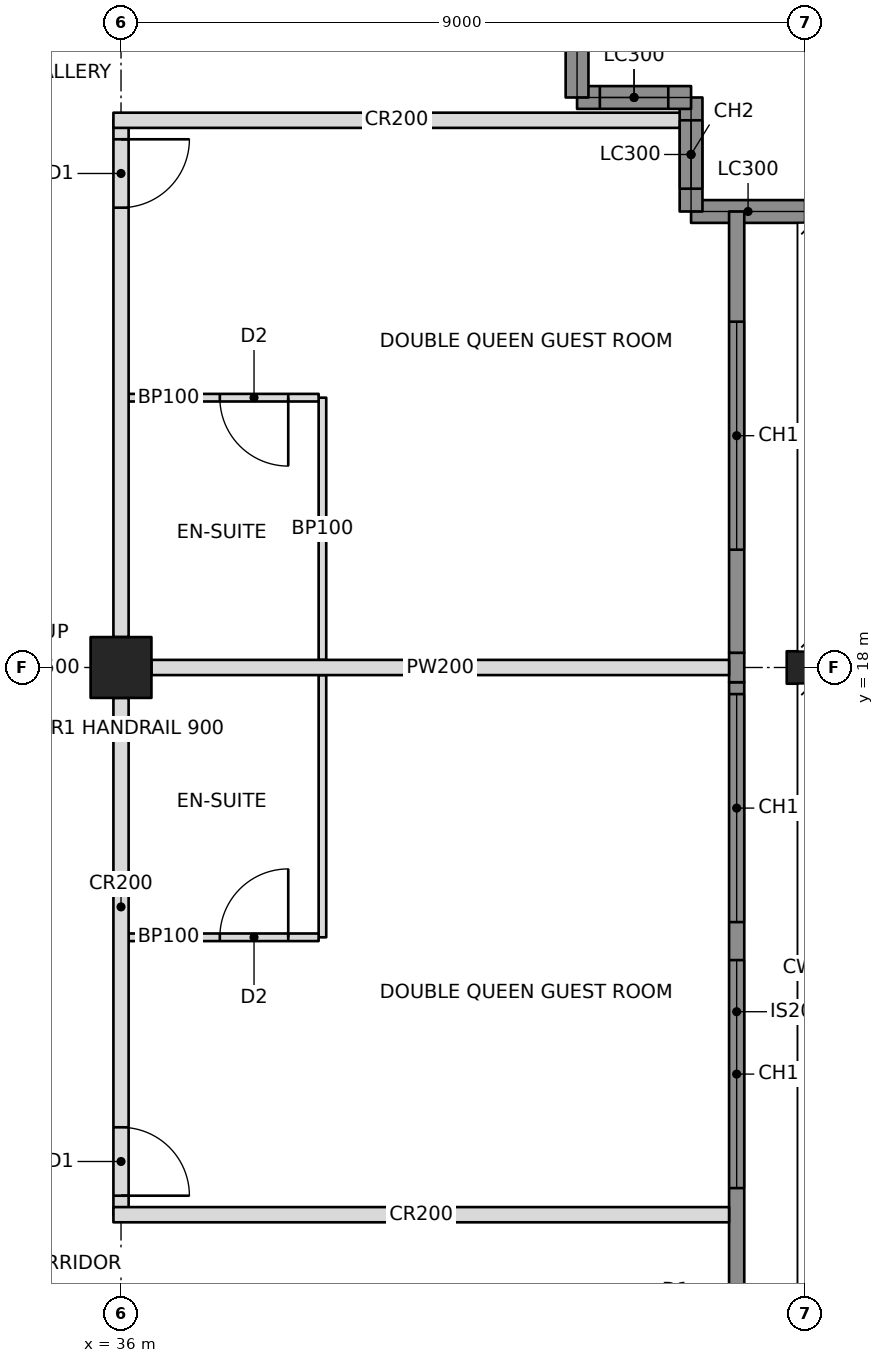
"""IFC4 building model, lengths in metres.
Left out: names, types, materials, properties, quantities, classifications, styles, units other than length and angle.
Written with IfcOpenShell. Run it as: python <this file> out.ifc"""

import sys

from ifc_helpers import new_model, si_unit, direction, frame, frame_2d, origin, origin_2d, place, context, subcontext, project, spatial, rectangle, hollow_rectangle, i_section, extrude, element, fill, save


model = new_model("IFC4")
c1 = context("Model", 3, precision=1e-05, world=origin(), true_north=direction((0.0, 1.0)))
c2 = subcontext(c1, "Body", "Model", "MODEL_VIEW")
j1 = project(units=[si_unit("LENGTHUNIT", "METRE"), si_unit("PLANEANGLEUNIT", "RADIAN")], contexts=[c1])
p1 = place(None, origin())
s1 = spatial("IfcSite", under=j1, at=p1, CompositionType="ELEMENT")
p2 = place(p1, origin())
s2 = spatial("IfcBuilding", under=s1, at=p2, CompositionType="ELEMENT")
p3 = place(p2, frame((0.0, 0.0, 214.8)))
s3 = spatial("IfcBuildingStorey", under=s2, at=p3, CompositionType="ELEMENT", Elevation=214.8)
p4 = place(p3, frame((36.0, 18.0, 0.0), z_axis=(0.0, 0.0, 1.0), x_axis=(0.0, 1.0, 0.0)))
e1 = element("IfcColumn", 1, at=p4, inside=s3, PredefinedType="COLUMN", context=c2, shape_type="SweptSolid", body=[
    extrude(hollow_rectangle(XDim=0.8, YDim=0.8, WallThickness=0.05, at=origin_2d()), origin(), (0.0, 0.0, 1.0), 3.4),
])
p5 = place(p3, frame((45.0, 18.0, 0.0), z_axis=(0.0, 0.0, 1.0), x_axis=(0.0, 1.0, 0.0)))
e2 = element("IfcColumn", 2, at=p5, inside=s3, PredefinedType="COLUMN", context=c2, shape_type="SweptSolid", body=[
    extrude(i_section(OverallWidth=0.427, OverallDepth=0.483, WebThickness=0.051, FlangeThickness=0.082, at=origin_2d()), origin(), (0.0, 0.0, 1.0), 3.4),
])
p6 = place(p3, frame((45.0, 24.0, 0.0), z_axis=(0.0, 0.0, 1.0), x_axis=(-1.0, 0.0, 0.0)))
e3 = element("IfcWall", 3, at=p6, inside=s3, PredefinedType="SOLIDWALL", context=c2, shape_type="SweptSolid", body=[
    extrude(rectangle(XDim=1.5, YDim=0.3, at=frame_2d((0.75, 0.0))), origin(), (0.0, 0.0, 1.0), 2.42),
])
p7 = place(p3, frame((43.5, 24.0, 0.0), z_axis=(0.0, 0.0, 1.0), x_axis=(0.0, 1.0, 0.0)))
e4 = element("IfcWall", 4, at=p7, inside=s3, PredefinedType="SOLIDWALL", context=c2, shape_type="SweptSolid", body=[
    extrude(rectangle(XDim=1.5, YDim=0.3, at=frame_2d((0.75, 0.0))), origin(), (0.0, 0.0, 1.0), 3.2),
])
p8 = place(p7, frame((0.3, 0.0, 0.6)))
e5 = element("IfcOpeningElement", 5, at=p8, cuts=e4, PredefinedType="OPENING", context=c2, shape_type="SweptSolid", body=[
    extrude(rectangle(XDim=0.9, YDim=2.2, at=frame_2d((0.45, 1.1))), frame((0.0, 0.16, 0.0), z_axis=(0.0, -1.0, 0.0), x_axis=(1.0, 0.0, 0.0)), (0.0, 0.0, 1.0), 0.32),
])
p9 = place(p3, frame((43.5, 25.5, 0.0), z_axis=(0.0, 0.0, 1.0), x_axis=(-1.0, 0.0, 0.0)))
e6 = element("IfcWall", 6, at=p9, inside=s3, PredefinedType="SOLIDWALL", context=c2, shape_type="SweptSolid", body=[
    extrude(rectangle(XDim=1.5, YDim=0.3, at=frame_2d((0.75, 0.0))), origin(), (0.0, 0.0, 1.0), 3.2),
])
p10 = place(p9, frame((0.3, 0.0, 0.6)))
e7 = element("IfcOpeningElement", 7, at=p10, cuts=e6, PredefinedType="OPENING", context=c2, shape_type="SweptSolid", body=[
    extrude(rectangle(XDim=0.9, YDim=2.2, at=frame_2d((0.45, 1.1))), frame((0.0, 0.16, 0.0), z_axis=(0.0, -1.0, 0.0), x_axis=(1.0, 0.0, 0.0)), (0.0, 0.0, 1.0), 0.32),
])
p11 = place(p3, frame((42.0, 25.5, 0.0), z_axis=(0.0, 0.0, 1.0), x_axis=(0.0, 1.0, 0.0)))
e8 = element("IfcWall", 8, at=p11, inside=s3, PredefinedType="SOLIDWALL", context=c2, shape_type="SweptSolid", body=[
    extrude(rectangle(XDim=1.5, YDim=0.3, at=frame_2d((0.75, 0.0))), origin(), (0.0, 0.0, 1.0), 2.42),
])
p12 = place(p3, frame((36.0, 10.8, 0.0), z_axis=(0.0, 0.0, 1.0), x_axis=(0.0, 1.0, 0.0)))
e9 = element("IfcWall", 9, at=p12, inside=s3, PredefinedType="PARTITIONING", context=c2, shape_type="SweptSolid", body=[
    extrude(rectangle(XDim=6.8, YDim=0.2, at=frame_2d((3.4, 0.0))), origin(), (0.0, 0.0, 1.0), 2.405),
])
p13 = place(p12, frame((0.25, 0.0, 0.0)))
e10 = element("IfcOpeningElement", 10, at=p13, cuts=e9, PredefinedType="OPENING", context=c2, shape_type="SweptSolid", body=[
    extrude(rectangle(XDim=0.9, YDim=2.1, at=frame_2d((0.45, 1.05))), frame((0.0, 0.11, 0.0), z_axis=(0.0, -1.0, 0.0), x_axis=(1.0, 0.0, 0.0)), (0.0, 0.0, 1.0), 0.22),
])
p14 = place(p3, frame((36.0, 18.4, 0.0), z_axis=(0.0, 0.0, 1.0), x_axis=(0.0, 1.0, 0.0)))
e11 = element("IfcWall", 11, at=p14, inside=s3, PredefinedType="PARTITIONING", context=c2, shape_type="SweptSolid", body=[
    extrude(rectangle(XDim=6.8, YDim=0.2, at=frame_2d((3.4, 0.0))), origin(), (0.0, 0.0, 1.0), 2.405),
])
p15 = place(p14, frame((5.65, 0.0, 0.0)))
e12 = element("IfcOpeningElement", 12, at=p15, cuts=e11, PredefinedType="OPENING", context=c2, shape_type="SweptSolid", body=[
    extrude(rectangle(XDim=0.9, YDim=2.1, at=frame_2d((0.45, 1.05))), frame((0.0, 0.11, 0.0), z_axis=(0.0, -1.0, 0.0), x_axis=(1.0, 0.0, 0.0)), (0.0, 0.0, 1.0), 0.22),
])
p16 = place(p3, frame((35.9, 10.8, 0.0), z_axis=(0.0, 0.0, 1.0), x_axis=(1.0, 0.0, 0.0)))
e13 = element("IfcWall", 13, at=p16, inside=s3, PredefinedType="PARTITIONING", context=c2, shape_type="SweptSolid", body=[
    extrude(rectangle(XDim=8.1, YDim=0.2, at=frame_2d((4.05, 0.0))), origin(), (0.0, 0.0, 1.0), 2.404),
])
p17 = place(p3, frame((35.9, 25.2, 0.0), z_axis=(0.0, 0.0, 1.0), x_axis=(1.0, 0.0, 0.0)))
e14 = element("IfcWall", 14, at=p17, inside=s3, PredefinedType="PARTITIONING", context=c2, shape_type="SweptSolid", body=[
    extrude(rectangle(XDim=7.45, YDim=0.2, at=frame_2d((3.725, 0.0))), origin(), (0.0, 0.0, 1.0), 2.404),
])
p18 = place(p3, frame((36.4, 18.0, 0.0), z_axis=(0.0, 0.0, 1.0), x_axis=(1.0, 0.0, 0.0)))
e15 = element("IfcWall", 15, at=p18, inside=s3, PredefinedType="PARTITIONING", context=c2, shape_type="SweptSolid", body=[
    extrude(rectangle(XDim=7.6, YDim=0.2, at=frame_2d((3.8, 0.0))), origin(), (0.0, 0.0, 1.0), 2.405),
])
p19 = place(p3, frame((38.65, 14.45, 0.0), z_axis=(0.0, 0.0, 1.0), x_axis=(0.0, 1.0, 0.0)))
e16 = element("IfcWall", 16, at=p19, inside=s3, PredefinedType="PARTITIONING", context=c2, shape_type="SweptSolid", body=[
    extrude(rectangle(XDim=3.45, YDim=0.1, at=frame_2d((1.725, 0.0))), origin(), (0.0, 0.0, 1.0), 2.404),
])
p20 = place(p3, frame((36.1, 14.45, 0.0), z_axis=(0.0, 0.0, 1.0), x_axis=(1.0, 0.0, 0.0)))
e17 = element("IfcWall", 17, at=p20, inside=s3, PredefinedType="PARTITIONING", context=c2, shape_type="SweptSolid", body=[
    extrude(rectangle(XDim=2.5, YDim=0.1, at=frame_2d((1.25, 0.0))), origin(), (0.0, 0.0, 1.0), 2.404),
])
p21 = place(p20, frame((1.2, 0.0, 0.0)))
e18 = element("IfcOpeningElement", 18, at=p21, cuts=e17, PredefinedType="OPENING", context=c2, shape_type="SweptSolid", body=[
    extrude(rectangle(XDim=0.9, YDim=2.1, at=frame_2d((0.45, 1.05))), frame((0.0, 0.06, 0.0), z_axis=(0.0, -1.0, 0.0), x_axis=(1.0, 0.0, 0.0)), (0.0, 0.0, 1.0), 0.12),
])
p22 = place(p3, frame((38.65, 18.1, 0.0), z_axis=(0.0, 0.0, 1.0), x_axis=(0.0, 1.0, 0.0)))
e19 = element("IfcWall", 19, at=p22, inside=s3, PredefinedType="PARTITIONING", context=c2, shape_type="SweptSolid", body=[
    extrude(rectangle(XDim=3.45, YDim=0.1, at=frame_2d((1.725, 0.0))), origin(), (0.0, 0.0, 1.0), 2.404),
])
p23 = place(p3, frame((36.1, 21.55, 0.0), z_axis=(0.0, 0.0, 1.0), x_axis=(1.0, 0.0, 0.0)))
e20 = element("IfcWall", 20, at=p23, inside=s3, PredefinedType="PARTITIONING", context=c2, shape_type="SweptSolid", body=[
    extrude(rectangle(XDim=2.5, YDim=0.1, at=frame_2d((1.25, 0.0))), origin(), (0.0, 0.0, 1.0), 2.404),
])
p24 = place(p23, frame((1.2, 0.0, 0.0)))
e21 = element("IfcOpeningElement", 21, at=p24, cuts=e20, PredefinedType="OPENING", context=c2, shape_type="SweptSolid", body=[
    extrude(rectangle(XDim=0.9, YDim=2.1, at=frame_2d((0.45, 1.05))), frame((0.0, 0.06, 0.0), z_axis=(0.0, -1.0, 0.0), x_axis=(1.0, 0.0, 0.0)), (0.0, 0.0, 1.0), 0.12),
])
p25 = place(p3, frame((44.1, 9.135, 0.0), z_axis=(0.0, 0.0, 1.0), x_axis=(0.0, 1.0, 0.0)))
e22 = element("IfcWall", 22, at=p25, inside=s3, PredefinedType="SOLIDWALL", context=c2, shape_type="SweptSolid", body=[
    extrude(rectangle(XDim=8.671, YDim=0.2, at=frame_2d((4.335, 0.0))), origin(), (0.0, 0.0, 1.0), 3.2),
])
p26 = place(p25, frame((2.015, 0.0, 0.6)))
e23 = element("IfcOpeningElement", 23, at=p26, cuts=e22, PredefinedType="OPENING", context=c2, shape_type="SweptSolid", body=[
    extrude(rectangle(XDim=3.0, YDim=2.2, at=frame_2d((1.5, 1.1))), frame((0.0, 0.11, 0.0), z_axis=(0.0, -1.0, 0.0), x_axis=(1.0, 0.0, 0.0)), (0.0, 0.0, 1.0), 0.22),
])
p27 = place(p25, frame((5.515, 0.0, 0.6)))
e24 = element("IfcOpeningElement", 24, at=p27, cuts=e22, PredefinedType="OPENING", context=c2, shape_type="SweptSolid", body=[
    extrude(rectangle(XDim=3.0, YDim=2.2, at=frame_2d((1.5, 1.1))), frame((0.0, 0.11, 0.0), z_axis=(0.0, -1.0, 0.0), x_axis=(1.0, 0.0, 0.0)), (0.0, 0.0, 1.0), 0.22),
])
p28 = place(p3, frame((44.1, 17.806, 0.0), z_axis=(0.0, 0.0, 1.0), x_axis=(0.0, 1.0, 0.0)))
e25 = element("IfcWall", 25, at=p28, inside=s3, PredefinedType="SOLIDWALL", context=c2, shape_type="SweptSolid", body=[
    extrude(rectangle(XDim=0.388, YDim=0.2, at=frame_2d((0.194, 0.0))), origin(), (0.0, 0.0, 1.0), 2.404),
])
p29 = place(p3, frame((44.1, 18.194, 0.0), z_axis=(0.0, 0.0, 1.0), x_axis=(0.0, 1.0, 0.0)))
e26 = element("IfcWall", 26, at=p29, inside=s3, PredefinedType="SOLIDWALL", context=c2, shape_type="SweptSolid", body=[
    extrude(rectangle(XDim=5.806, YDim=0.2, at=frame_2d((2.903, 0.0))), origin(), (0.0, 0.0, 1.0), 3.2),
])
p30 = place(p29, frame((1.356, 0.0, 0.6)))
e27 = element("IfcOpeningElement", 27, at=p30, cuts=e26, PredefinedType="OPENING", context=c2, shape_type="SweptSolid", body=[
    extrude(rectangle(XDim=3.0, YDim=2.2, at=frame_2d((1.5, 1.1))), frame((0.0, 0.11, 0.0), z_axis=(0.0, -1.0, 0.0), x_axis=(1.0, 0.0, 0.0)), (0.0, 0.0, 1.0), 0.22),
])
p31 = place(p8, origin())
e28 = element("IfcWindow", 28, at=p31, inside=s3, PartitioningType="SINGLE_PANEL", PredefinedType="WINDOW", context=c2, shape_type="SweptSolid", body=[
    extrude(rectangle(XDim=0.9, YDim=2.2, at=frame_2d((0.45, 1.1))), frame((0.0, 0.03, 0.0), z_axis=(0.0, -1.0, 0.0), x_axis=(1.0, 0.0, 0.0)), (0.0, 0.0, 1.0), 0.06),
])
fill(e5, e28)
p32 = place(p10, origin())
e29 = element("IfcWindow", 29, at=p32, inside=s3, PartitioningType="SINGLE_PANEL", PredefinedType="WINDOW", context=c2, shape_type="SweptSolid", body=[
    extrude(rectangle(XDim=0.9, YDim=2.2, at=frame_2d((0.45, 1.1))), frame((0.0, 0.03, 0.0), z_axis=(0.0, -1.0, 0.0), x_axis=(1.0, 0.0, 0.0)), (0.0, 0.0, 1.0), 0.06),
])
fill(e7, e29)
p33 = place(p26, origin())
e30 = element("IfcWindow", 30, at=p33, inside=s3, PartitioningType="TRIPLE_PANEL_VERTICAL", PredefinedType="WINDOW", context=c2, shape_type="SweptSolid", body=[
    extrude(rectangle(XDim=3.0, YDim=2.2, at=frame_2d((1.5, 1.1))), frame((0.0, 0.03, 0.0), z_axis=(0.0, -1.0, 0.0), x_axis=(1.0, 0.0, 0.0)), (0.0, 0.0, 1.0), 0.06),
])
fill(e23, e30)
p34 = place(p27, origin())
e31 = element("IfcWindow", 31, at=p34, inside=s3, PartitioningType="TRIPLE_PANEL_VERTICAL", PredefinedType="WINDOW", context=c2, shape_type="SweptSolid", body=[
    extrude(rectangle(XDim=3.0, YDim=2.2, at=frame_2d((1.5, 1.1))), frame((0.0, 0.03, 0.0), z_axis=(0.0, -1.0, 0.0), x_axis=(1.0, 0.0, 0.0)), (0.0, 0.0, 1.0), 0.06),
])
fill(e24, e31)
p35 = place(p30, origin())
e32 = element("IfcWindow", 32, at=p35, inside=s3, PartitioningType="TRIPLE_PANEL_VERTICAL", PredefinedType="WINDOW", context=c2, shape_type="SweptSolid", body=[
    extrude(rectangle(XDim=3.0, YDim=2.2, at=frame_2d((1.5, 1.1))), frame((0.0, 0.03, 0.0), z_axis=(0.0, -1.0, 0.0), x_axis=(1.0, 0.0, 0.0)), (0.0, 0.0, 1.0), 0.06),
])
fill(e27, e32)
p36 = place(p21, origin())
e33 = element("IfcDoor", 33, at=p36, inside=s3, OperationType="SINGLE_SWING_RIGHT", PredefinedType="DOOR", context=c2, shape_type="SweptSolid", body=[
    extrude(rectangle(XDim=0.9, YDim=2.1, at=frame_2d((0.45, 1.05))), frame((0.0, 0.025, 0.0), z_axis=(0.0, -1.0, 0.0), x_axis=(1.0, 0.0, 0.0)), (0.0, 0.0, 1.0), 0.05),
])
fill(e18, e33)
p37 = place(p13, frame((0.9, 0.0, 0.0), z_axis=(0.0, 0.0, 1.0), x_axis=(-1.0, 0.0, 0.0)))
e34 = element("IfcDoor", 34, at=p37, inside=s3, OperationType="SINGLE_SWING_RIGHT", PredefinedType="DOOR", context=c2, shape_type="SweptSolid", body=[
    extrude(rectangle(XDim=0.9, YDim=2.1, at=frame_2d((0.45, 1.05))), frame((0.0, 0.025, 0.0), z_axis=(0.0, -1.0, 0.0), x_axis=(1.0, 0.0, 0.0)), (0.0, 0.0, 1.0), 0.05),
])
fill(e10, e34)
p38 = place(p24, frame((0.9, 0.0, 0.0), z_axis=(0.0, 0.0, 1.0), x_axis=(-1.0, 0.0, 0.0)))
e35 = element("IfcDoor", 35, at=p38, inside=s3, OperationType="SINGLE_SWING_LEFT", PredefinedType="DOOR", context=c2, shape_type="SweptSolid", body=[
    extrude(rectangle(XDim=0.9, YDim=2.1, at=frame_2d((0.45, 1.05))), frame((0.0, 0.025, 0.0), z_axis=(0.0, -1.0, 0.0), x_axis=(1.0, 0.0, 0.0)), (0.0, 0.0, 1.0), 0.05),
])
fill(e21, e35)
p39 = place(p15, frame((0.9, 0.0, 0.0), z_axis=(0.0, 0.0, 1.0), x_axis=(-1.0, 0.0, 0.0)))
e36 = element("IfcDoor", 36, at=p39, inside=s3, OperationType="SINGLE_SWING_LEFT", PredefinedType="DOOR", context=c2, shape_type="SweptSolid", body=[
    extrude(rectangle(XDim=0.9, YDim=2.1, at=frame_2d((0.45, 1.05))), frame((0.0, 0.025, 0.0), z_axis=(0.0, -1.0, 0.0), x_axis=(1.0, 0.0, 0.0)), (0.0, 0.0, 1.0), 0.05),
])
fill(e12, e36)
save(model, sys.argv[1])
